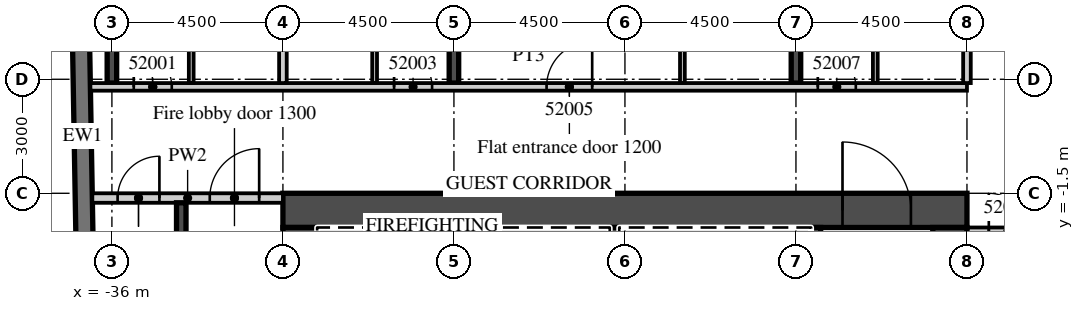
"""IFC4 building model, lengths in metres.
Left out: names, types, materials, properties, quantities, classifications, styles, units other than length and angle.
Written with IfcOpenShell. Run it as: python <this file> out.ifc"""

import sys

from ifc_helpers import new_model, si_unit, direction, frame, frame_2d, origin, place, context, subcontext, project, spatial, rectangle, extrude, element, fill, save


model = new_model("IFC4")
c1 = context("Model", 3, precision=1e-05, world=origin(), true_north=direction((0.0, 1.0)))
c2 = subcontext(c1, "Body", "Model", "MODEL_VIEW")
j1 = project(units=[si_unit("LENGTHUNIT", "METRE"), si_unit("PLANEANGLEUNIT", "RADIAN")], contexts=[c1])
p1 = place(None, origin())
s1 = spatial("IfcSite", under=j1, at=p1, CompositionType="ELEMENT")
p2 = place(p1, origin())
s2 = spatial("IfcBuilding", under=s1, at=p2, CompositionType="ELEMENT")
p3 = place(p2, frame((0.0, 0.0, 217.7)))
s3 = spatial("IfcBuildingStorey", under=s2, at=p3, CompositionType="ELEMENT", Elevation=217.7)
p4 = place(p3, frame((-36.0, 1.4, 0.0), z_axis=(0.0, 0.0, 1.0), x_axis=(0.0, 1.0, 0.0)))
e1 = element("IfcWall", 1, at=p4, inside=s3, PredefinedType="SHEAR", context=c2, shape_type="SweptSolid", body=[
    extrude(rectangle(XDim=17.125, YDim=0.25, at=frame_2d((8.563, 0.0))), origin(), (0.0, 0.0, 1.0), 3.3),
])
p5 = place(p3, frame((-27.0, 1.4, 0.0), z_axis=(0.0, 0.0, 1.0), x_axis=(0.0, 1.0, 0.0)))
e2 = element("IfcWall", 2, at=p5, inside=s3, PredefinedType="SHEAR", context=c2, shape_type="SweptSolid", body=[
    extrude(rectangle(XDim=18.817, YDim=0.25, at=frame_2d((9.409, 0.0))), origin(), (0.0, 0.0, 1.0), 3.3),
])
p6 = place(p3, frame((-18.0, 1.4, 0.0), z_axis=(0.0, 0.0, 1.0), x_axis=(0.0, 1.0, 0.0)))
e3 = element("IfcWall", 3, at=p6, inside=s3, PredefinedType="SHEAR", context=c2, shape_type="SweptSolid", body=[
    extrude(rectangle(XDim=18.974, YDim=0.25, at=frame_2d((9.487, 0.0))), origin(), (0.0, 0.0, 1.0), 3.3),
])
p7 = place(p3, frame((-37.057, 16.503, 0.0), z_axis=(0.0, 0.0, 1.0), x_axis=(0.017452279857, -0.999847697366, 0.0)))
e4 = element("IfcWall", 4, at=p7, inside=s3, PredefinedType="SOLIDWALL", context=c2, shape_type="SweptSolid", body=[
    extrude(rectangle(XDim=33.0, YDim=0.45, at=frame_2d((16.5, 0.0))), origin(), (0.0, 0.0, 1.0), 3.02),
])
p8 = place(p3, frame((-36.566, 1.3, 0.0), z_axis=(0.0, 0.0, 1.0), x_axis=(1.0, 0.0, 0.0)))
e5 = element("IfcWall", 5, at=p8, inside=s3, PredefinedType="PARTITIONING", context=c2, shape_type="SweptSolid", body=[
    extrude(rectangle(XDim=23.066, YDim=0.2, at=frame_2d((11.533, 0.0))), origin(), (0.0, 0.0, 1.0), 3.02),
])
p9 = place(p8, frame((1.141, 0.0, 0.0)))
e6 = element("IfcOpeningElement", 6, at=p9, cuts=e5, PredefinedType="OPENING", context=c2, shape_type="SweptSolid", body=[
    extrude(rectangle(XDim=1.0, YDim=2.1, at=frame_2d((0.5, 1.05))), frame((0.0, 0.11, 0.0), z_axis=(0.0, -1.0, 0.0), x_axis=(1.0, 0.0, 0.0)), (0.0, 0.0, 1.0), 0.22),
])
p10 = place(p8, frame((7.991, 0.0, 0.0)))
e7 = element("IfcOpeningElement", 7, at=p10, cuts=e5, PredefinedType="OPENING", context=c2, shape_type="SweptSolid", body=[
    extrude(rectangle(XDim=1.0, YDim=2.1, at=frame_2d((0.5, 1.05))), frame((0.0, 0.11, 0.0), z_axis=(0.0, -1.0, 0.0), x_axis=(1.0, 0.0, 0.0)), (0.0, 0.0, 1.0), 0.22),
])
p11 = place(p8, frame((12.004, 0.0, 0.0)))
e8 = element("IfcOpeningElement", 8, at=p11, cuts=e5, PredefinedType="OPENING", context=c2, shape_type="SweptSolid", body=[
    extrude(rectangle(XDim=1.2, YDim=2.1, at=frame_2d((0.6, 1.05))), frame((0.0, 0.11, 0.0), z_axis=(0.0, -1.0, 0.0), x_axis=(1.0, 0.0, 0.0)), (0.0, 0.0, 1.0), 0.22),
])
p12 = place(p8, frame((19.141, 0.0, 0.0)))
e9 = element("IfcOpeningElement", 9, at=p12, cuts=e5, PredefinedType="OPENING", context=c2, shape_type="SweptSolid", body=[
    extrude(rectangle(XDim=1.0, YDim=2.1, at=frame_2d((0.5, 1.05))), frame((0.0, 0.11, 0.0), z_axis=(0.0, -1.0, 0.0), x_axis=(1.0, 0.0, 0.0)), (0.0, 0.0, 1.0), 0.22),
])
p13 = place(p3, frame((-31.5, 1.4, 0.0), z_axis=(0.0, 0.0, 1.0), x_axis=(0.0, 1.0, 0.0)))
e10 = element("IfcWall", 10, at=p13, inside=s3, PredefinedType="PARTITIONING", context=c2, shape_type="SweptSolid", body=[
    extrude(rectangle(XDim=18.751, YDim=0.2, at=frame_2d((9.375, 0.0))), origin(), (0.0, 0.0, 1.0), 3.02),
])
p14 = place(p3, frame((-33.913, 1.4, 0.0), z_axis=(0.0, 0.0, 1.0), x_axis=(0.0, 1.0, 0.0)))
e11 = element("IfcWall", 11, at=p14, inside=s3, PredefinedType="PARTITIONING", context=c2, shape_type="SweptSolid", body=[
    extrude(rectangle(XDim=6.725, YDim=0.125, at=frame_2d((3.363, 0.0))), origin(), (0.0, 0.0, 1.0), 3.02),
])
p15 = place(p14, frame((2.45, 0.0, 0.0)))
e12 = element("IfcOpeningElement", 12, at=p15, cuts=e11, PredefinedType="OPENING", context=c2, shape_type="SweptSolid", body=[
    extrude(rectangle(XDim=0.9, YDim=2.1, at=frame_2d((0.45, 1.05))), frame((0.0, 0.073, 0.0), z_axis=(0.0, -1.0, 0.0), x_axis=(1.0, 0.0, 0.0)), (0.0, 0.0, 1.0), 0.145),
])
p16 = place(p3, frame((-29.087, 1.4, 0.0), z_axis=(0.0, 0.0, 1.0), x_axis=(0.0, 1.0, 0.0)))
e13 = element("IfcWall", 13, at=p16, inside=s3, PredefinedType="PARTITIONING", context=c2, shape_type="SweptSolid", body=[
    extrude(rectangle(XDim=6.725, YDim=0.125, at=frame_2d((3.363, 0.0))), origin(), (0.0, 0.0, 1.0), 3.02),
])
p17 = place(p16, frame((2.45, 0.0, 0.0)))
e14 = element("IfcOpeningElement", 14, at=p17, cuts=e13, PredefinedType="OPENING", context=c2, shape_type="SweptSolid", body=[
    extrude(rectangle(XDim=0.9, YDim=2.1, at=frame_2d((0.45, 1.05))), frame((0.0, 0.073, 0.0), z_axis=(0.0, -1.0, 0.0), x_axis=(1.0, 0.0, 0.0)), (0.0, 0.0, 1.0), 0.145),
])
p18 = place(p3, frame((-20.988, 1.4, 0.0), z_axis=(0.0, 0.0, 1.0), x_axis=(0.0, 1.0, 0.0)))
e15 = element("IfcWall", 15, at=p18, inside=s3, PredefinedType="PARTITIONING", context=c2, shape_type="SweptSolid", body=[
    extrude(rectangle(XDim=6.725, YDim=0.125, at=frame_2d((3.363, 0.0))), origin(), (0.0, 0.0, 1.0), 3.02),
])
p19 = place(p18, frame((2.45, 0.0, 0.0)))
e16 = element("IfcOpeningElement", 16, at=p19, cuts=e15, PredefinedType="OPENING", context=c2, shape_type="SweptSolid", body=[
    extrude(rectangle(XDim=0.9, YDim=2.1, at=frame_2d((0.45, 1.05))), frame((0.0, 0.073, 0.0), z_axis=(0.0, -1.0, 0.0), x_axis=(1.0, 0.0, 0.0)), (0.0, 0.0, 1.0), 0.145),
])
p20 = place(p3, frame((-13.5, 1.4, 0.0), z_axis=(0.0, 0.0, 1.0), x_axis=(0.0, 1.0, 0.0)))
e17 = element("IfcWall", 17, at=p20, inside=s3, PredefinedType="PARTITIONING", context=c2, shape_type="SweptSolid", body=[
    extrude(rectangle(XDim=19.065, YDim=0.2, at=frame_2d((9.533, 0.0))), origin(), (0.0, 0.0, 1.0), 3.02),
])
p21 = place(p3, frame((-15.912, 1.4, 0.0), z_axis=(0.0, 0.0, 1.0), x_axis=(0.0, 1.0, 0.0)))
e18 = element("IfcWall", 18, at=p21, inside=s3, PredefinedType="PARTITIONING", context=c2, shape_type="SweptSolid", body=[
    extrude(rectangle(XDim=6.725, YDim=0.125, at=frame_2d((3.363, 0.0))), origin(), (0.0, 0.0, 1.0), 3.02),
])
p22 = place(p21, frame((2.45, 0.0, 0.0)))
e19 = element("IfcOpeningElement", 19, at=p22, cuts=e18, PredefinedType="OPENING", context=c2, shape_type="SweptSolid", body=[
    extrude(rectangle(XDim=0.9, YDim=2.1, at=frame_2d((0.45, 1.05))), frame((0.0, 0.073, 0.0), z_axis=(0.0, -1.0, 0.0), x_axis=(1.0, 0.0, 0.0)), (0.0, 0.0, 1.0), 0.145),
])
p23 = place(p3, frame((-13.5, -2.5, 0.0), z_axis=(0.0, 0.0, 1.0), x_axis=(1.0, 0.0, 0.0)))
e20 = element("IfcWall", 20, at=p23, inside=s3, PredefinedType="PARTITIONING", context=c2, shape_type="SweptSolid", body=[
    extrude(rectangle(XDim=27.0, YDim=0.2, at=frame_2d((13.5, 0.0))), origin(), (0.0, 0.0, 1.0), 3.02),
])
p24 = place(p23, frame((0.575, 0.0, 0.0)))
e21 = element("IfcOpeningElement", 21, at=p24, cuts=e20, PredefinedType="OPENING", context=c2, shape_type="SweptSolid", body=[
    extrude(rectangle(XDim=1.0, YDim=2.1, at=frame_2d((0.5, 1.05))), frame((0.0, 0.11, 0.0), z_axis=(0.0, -1.0, 0.0), x_axis=(1.0, 0.0, 0.0)), (0.0, 0.0, 1.0), 0.22),
])
p25 = place(p23, frame((6.938, 0.0, 0.0)))
e22 = element("IfcOpeningElement", 22, at=p25, cuts=e20, PredefinedType="OPENING", context=c2, shape_type="SweptSolid", body=[
    extrude(rectangle(XDim=1.2, YDim=2.1, at=frame_2d((0.6, 1.05))), frame((0.0, 0.11, 0.0), z_axis=(0.0, -1.0, 0.0), x_axis=(1.0, 0.0, 0.0)), (0.0, 0.0, 1.0), 0.22),
])
p26 = place(p23, frame((15.938, 0.0, 0.0)))
e23 = element("IfcOpeningElement", 23, at=p26, cuts=e20, PredefinedType="OPENING", context=c2, shape_type="SweptSolid", body=[
    extrude(rectangle(XDim=1.2, YDim=2.1, at=frame_2d((0.6, 1.05))), frame((0.0, 0.11, 0.0), z_axis=(0.0, -1.0, 0.0), x_axis=(1.0, 0.0, 0.0)), (0.0, 0.0, 1.0), 0.22),
])
p27 = place(p23, frame((25.425, 0.0, 0.0)))
e24 = element("IfcOpeningElement", 24, at=p27, cuts=e20, PredefinedType="OPENING", context=c2, shape_type="SweptSolid", body=[
    extrude(rectangle(XDim=1.0, YDim=2.1, at=frame_2d((0.5, 1.05))), frame((0.0, 0.11, 0.0), z_axis=(0.0, -1.0, 0.0), x_axis=(1.0, 0.0, 0.0)), (0.0, 0.0, 1.0), 0.22),
])
p28 = place(p3, frame((-31.5, -1.95, 0.0), z_axis=(0.0, 0.0, 1.0), x_axis=(1.0, 0.0, 0.0)))
e25 = element("IfcWall", 25, at=p28, inside=s3, PredefinedType="SHEAR", context=c2, shape_type="SweptSolid", body=[
    extrude(rectangle(XDim=18.0, YDim=0.9, at=frame_2d((9.0, 0.0))), origin(), (0.0, 0.0, 1.0), 3.02),
])
p29 = place(p28, frame((14.725, 0.0, 0.0)))
e26 = element("IfcOpeningElement", 26, at=p29, cuts=e25, PredefinedType="OPENING", context=c2, shape_type="SweptSolid", body=[
    extrude(rectangle(XDim=1.8, YDim=2.1, at=frame_2d((0.9, 1.05))), frame((0.0, 0.46, 0.0), z_axis=(0.0, -1.0, 0.0), x_axis=(1.0, 0.0, 0.0)), (0.0, 0.0, 1.0), 0.92),
])
p30 = place(p3, frame((-31.05, -15.2, 0.0), z_axis=(0.0, 0.0, 1.0), x_axis=(0.0, 1.0, 0.0)))
e27 = element("IfcWall", 27, at=p30, inside=s3, PredefinedType="SHEAR", context=c2, shape_type="SweptSolid", body=[
    extrude(rectangle(XDim=12.8, YDim=0.9, at=frame_2d((6.4, 0.0))), origin(), (0.0, 0.0, 1.0), 3.02),
])
p31 = place(p30, frame((11.5, 0.0, 0.0)))
e28 = element("IfcOpeningElement", 28, at=p31, cuts=e27, PredefinedType="OPENING", context=c2, shape_type="SweptSolid", body=[
    extrude(rectangle(XDim=1.1, YDim=2.1, at=frame_2d((0.55, 1.05))), frame((0.0, 0.46, 0.0), z_axis=(0.0, -1.0, 0.0), x_axis=(1.0, 0.0, 0.0)), (0.0, 0.0, 1.0), 0.92),
])
p32 = place(p3, frame((-13.95, -14.6, 0.0), z_axis=(0.0, 0.0, 1.0), x_axis=(0.0, 1.0, 0.0)))
e29 = element("IfcWall", 29, at=p32, inside=s3, PredefinedType="SHEAR", context=c2, shape_type="SweptSolid", body=[
    extrude(rectangle(XDim=12.2, YDim=0.9, at=frame_2d((6.1, 0.0))), origin(), (0.0, 0.0, 1.0), 3.02),
])
p33 = place(p3, frame((-17.475, -5.55, 0.0), z_axis=(0.0, 0.0, 1.0), x_axis=(0.0, 1.0, 0.0)))
e30 = element("IfcWall", 30, at=p33, inside=s3, PredefinedType="SHEAR", context=c2, shape_type="SweptSolid", body=[
    extrude(rectangle(XDim=3.15, YDim=0.25, at=frame_2d((1.575, 0.0))), origin(), (0.0, 0.0, 1.0), 3.02),
])
for number, where, z_axis, x_axis in (
    (31, (-27.975, -5.3, 0.0), (0.0, 0.0, 1.0), (0.0, 1.0, 0.0)),
    (32, (-22.775, -5.3, 0.0), (0.0, 0.0, 1.0), (0.0, 1.0, 0.0)),
):
    element("IfcWall", number, at=place(p3, frame(where, z_axis=z_axis, x_axis=x_axis)), inside=s3, PredefinedType="SHEAR", context=c2, shape_type="SweptSolid", body=[
        extrude(rectangle(XDim=2.9, YDim=0.25, at=frame_2d((1.45, 0.0))), origin(), (0.0, 0.0, 1.0), 3.02),
    ])
p34 = place(p3, frame((-36.515, -1.625, 0.0), z_axis=(0.0, 0.0, 1.0), x_axis=(1.0, 0.0, 0.0)))
e33 = element("IfcWall", 33, at=p34, inside=s3, PredefinedType="PARTITIONING", context=c2, shape_type="SweptSolid", body=[
    extrude(rectangle(XDim=5.015, YDim=0.25, at=frame_2d((2.508, 0.0))), origin(), (0.0, 0.0, 1.0), 3.02),
])
p35 = place(p34, frame((3.09, 0.0, 0.0)))
e34 = element("IfcOpeningElement", 34, at=p35, cuts=e33, PredefinedType="OPENING", context=c2, shape_type="SweptSolid", body=[
    extrude(rectangle(XDim=1.3, YDim=2.1, at=frame_2d((0.65, 1.05))), frame((0.0, 0.135, 0.0), z_axis=(0.0, -1.0, 0.0), x_axis=(1.0, 0.0, 0.0)), (0.0, 0.0, 1.0), 0.27),
])
p36 = place(p34, frame((0.665, 0.0, 0.0)))
e35 = element("IfcOpeningElement", 35, at=p36, cuts=e33, PredefinedType="OPENING", context=c2, shape_type="SweptSolid", body=[
    extrude(rectangle(XDim=1.1, YDim=2.1, at=frame_2d((0.55, 1.05))), frame((0.0, 0.135, 0.0), z_axis=(0.0, -1.0, 0.0), x_axis=(1.0, 0.0, 0.0)), (0.0, 0.0, 1.0), 0.27),
])
p37 = place(p3, frame((-34.175, -10.1, 0.0), z_axis=(0.0, 0.0, 1.0), x_axis=(0.0, 1.0, 0.0)))
e36 = element("IfcWall", 36, at=p37, inside=s3, PredefinedType="SHEAR", context=c2, shape_type="SweptSolid", body=[
    extrude(rectangle(XDim=8.35, YDim=0.25, at=frame_2d((4.175, 0.0))), origin(), (0.0, 0.0, 1.0), 3.02),
])
p38 = place(p9, origin())
e37 = element("IfcDoor", 37, at=p38, inside=s3, OperationType="SINGLE_SWING_LEFT", PredefinedType="DOOR", context=c2, shape_type="SweptSolid", body=[
    extrude(rectangle(XDim=1.0, YDim=2.1, at=frame_2d((0.5, 1.05))), frame((0.0, 0.025, 0.0), z_axis=(0.0, -1.0, 0.0), x_axis=(1.0, 0.0, 0.0)), (0.0, 0.0, 1.0), 0.05),
])
fill(e6, e37)
p39 = place(p10, origin())
e38 = element("IfcDoor", 38, at=p39, inside=s3, OperationType="SINGLE_SWING_LEFT", PredefinedType="DOOR", context=c2, shape_type="SweptSolid", body=[
    extrude(rectangle(XDim=1.0, YDim=2.1, at=frame_2d((0.5, 1.05))), frame((0.0, 0.025, 0.0), z_axis=(0.0, -1.0, 0.0), x_axis=(1.0, 0.0, 0.0)), (0.0, 0.0, 1.0), 0.05),
])
fill(e7, e38)
p40 = place(p11, origin())
e39 = element("IfcDoor", 39, at=p40, inside=s3, OperationType="SINGLE_SWING_RIGHT", PredefinedType="DOOR", context=c2, shape_type="SweptSolid", body=[
    extrude(rectangle(XDim=1.2, YDim=2.1, at=frame_2d((0.6, 1.05))), frame((0.0, 0.025, 0.0), z_axis=(0.0, -1.0, 0.0), x_axis=(1.0, 0.0, 0.0)), (0.0, 0.0, 1.0), 0.05),
])
fill(e8, e39)
p41 = place(p12, origin())
e40 = element("IfcDoor", 40, at=p41, inside=s3, OperationType="SINGLE_SWING_LEFT", PredefinedType="DOOR", context=c2, shape_type="SweptSolid", body=[
    extrude(rectangle(XDim=1.0, YDim=2.1, at=frame_2d((0.5, 1.05))), frame((0.0, 0.025, 0.0), z_axis=(0.0, -1.0, 0.0), x_axis=(1.0, 0.0, 0.0)), (0.0, 0.0, 1.0), 0.05),
])
fill(e9, e40)
p42 = place(p24, origin())
e41 = element("IfcDoor", 41, at=p42, inside=s3, OperationType="SINGLE_SWING_LEFT", PredefinedType="DOOR", context=c2, shape_type="SweptSolid", body=[
    extrude(rectangle(XDim=1.0, YDim=2.1, at=frame_2d((0.5, 1.05))), frame((0.0, 0.025, 0.0), z_axis=(0.0, -1.0, 0.0), x_axis=(1.0, 0.0, 0.0)), (0.0, 0.0, 1.0), 0.05),
])
fill(e21, e41)
p43 = place(p29, origin())
e42 = element("IfcDoor", 42, at=p43, inside=s3, OperationType="DOUBLE_DOOR_DOUBLE_SWING", PredefinedType="DOOR", context=c2, shape_type="SweptSolid", body=[
    extrude(rectangle(XDim=1.8, YDim=2.1, at=frame_2d((0.9, 1.05))), frame((0.0, 0.025, 0.0), z_axis=(0.0, -1.0, 0.0), x_axis=(1.0, 0.0, 0.0)), (0.0, 0.0, 1.0), 0.05),
])
fill(e26, e42)
p44 = place(p35, origin())
e43 = element("IfcDoor", 43, at=p44, inside=s3, OperationType="SINGLE_SWING_RIGHT", PredefinedType="DOOR", context=c2, shape_type="SweptSolid", body=[
    extrude(rectangle(XDim=1.3, YDim=2.1, at=frame_2d((0.65, 1.05))), frame((0.0, 0.025, 0.0), z_axis=(0.0, -1.0, 0.0), x_axis=(1.0, 0.0, 0.0)), (0.0, 0.0, 1.0), 0.05),
])
fill(e34, e43)
p45 = place(p36, origin())
e44 = element("IfcDoor", 44, at=p45, inside=s3, OperationType="SINGLE_SWING_RIGHT", PredefinedType="DOOR", context=c2, shape_type="SweptSolid", body=[
    extrude(rectangle(XDim=1.1, YDim=2.1, at=frame_2d((0.55, 1.05))), frame((0.0, 0.025, 0.0), z_axis=(0.0, -1.0, 0.0), x_axis=(1.0, 0.0, 0.0)), (0.0, 0.0, 1.0), 0.05),
])
fill(e35, e44)
save(model, sys.argv[1])
